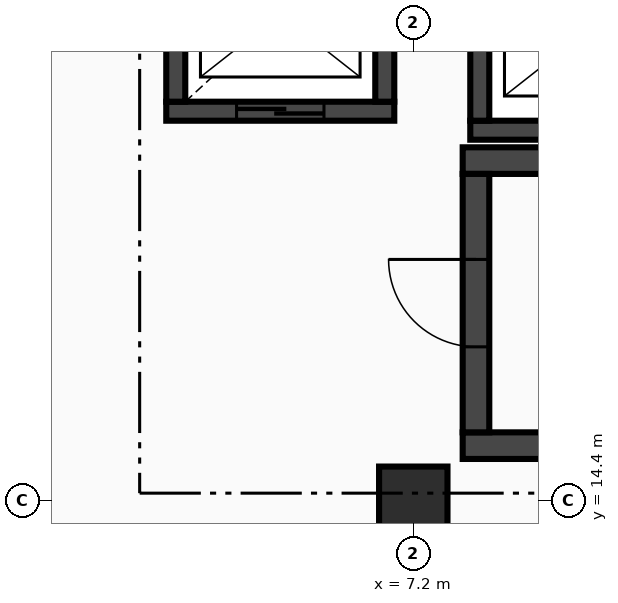
"""IFC4 building model, lengths in metres.
Left out: names, types, materials, properties, quantities, classifications, styles, units other than length and angle.
Written with IfcOpenShell. Run it as: python <this file> out.ifc"""

import sys

from ifc_helpers import new_model, si_unit, direction, frame, frame_2d, origin, origin_2d, place, context, subcontext, project, spatial, rectangle, extrude, element, fill, save


model = new_model("IFC4")
c1 = context("Model", 3, precision=1e-05, world=origin(), true_north=direction((0.0, 1.0)))
c2 = subcontext(c1, "Body", "Model", "MODEL_VIEW")
j1 = project(units=[si_unit("LENGTHUNIT", "METRE"), si_unit("PLANEANGLEUNIT", "RADIAN")], contexts=[c1])
p1 = place(None, origin())
s1 = spatial("IfcSite", under=j1, at=p1, CompositionType="ELEMENT")
p2 = place(p1, origin())
s2 = spatial("IfcBuilding", under=s1, at=p2, CompositionType="ELEMENT")
p3 = place(p2, origin())
s3 = spatial("IfcBuildingStorey", under=s2, at=p3, CompositionType="ELEMENT", Elevation=0.0)
p4 = place(p3, frame((7.2, 14.4, 0.0), z_axis=(0.0, 0.0, 1.0), x_axis=(1.0, 0.0, 0.0)))
e1 = element("IfcColumn", 1, at=p4, inside=s3, PredefinedType="COLUMN", context=c2, shape_type="SweptSolid", body=[
    extrude(rectangle(XDim=0.9, YDim=0.9, at=origin_2d()), origin(), (0.0, 0.0, 1.0), 5.4),
])
for number, where, z_axis, x_axis in (
    (2, (7.85, 15.125, 0.0), (0.0, 0.0, 1.0), (1.0, 0.0, 0.0)),
    (3, (17.15, 18.875, 0.0), (0.0, 0.0, 1.0), (-1.0, 0.0, 0.0)),
):
    element("IfcWall", number, at=place(p3, frame(where, z_axis=z_axis, x_axis=x_axis)), inside=s3, PredefinedType="SHEAR", context=c2, shape_type="SweptSolid", body=[
        extrude(rectangle(XDim=9.3, YDim=0.35, at=frame_2d((4.65, 0.0))), origin(), (0.0, 0.0, 1.0), 5.12),
    ])
p5 = place(p3, frame((8.025, 18.7, 0.0), z_axis=(0.0, 0.0, 1.0), x_axis=(0.0, -1.0, 0.0)))
e4 = element("IfcWall", 4, at=p5, inside=s3, PredefinedType="SHEAR", context=c2, shape_type="SweptSolid", body=[
    extrude(rectangle(XDim=3.4, YDim=0.35, at=frame_2d((1.7, 0.0))), origin(), (0.0, 0.0, 1.0), 5.12),
])
p6 = place(p5, frame((1.125, 0.0, 0.0)))
e5 = element("IfcOpeningElement", 5, at=p6, cuts=e4, PredefinedType="OPENING", context=c2, shape_type="SweptSolid", body=[
    extrude(rectangle(XDim=1.15, YDim=2.1, at=frame_2d((0.575, 1.05))), frame((0.0, 0.185, 0.0), z_axis=(0.0, -1.0, 0.0), x_axis=(1.0, 0.0, 0.0)), (0.0, 0.0, 1.0), 0.37),
])
p7 = place(p3, frame((3.95, 19.525, 0.0), z_axis=(0.0, 0.0, 1.0), x_axis=(1.0, 0.0, 0.0)))
e6 = element("IfcWall", 6, at=p7, inside=s3, PredefinedType="SHEAR", context=c2, shape_type="SweptSolid", body=[
    extrude(rectangle(XDim=3.0, YDim=0.25, at=frame_2d((1.5, 0.0))), origin(), (0.0, 0.0, 1.0), 5.12),
])
p8 = place(p7, frame((0.925, 0.0, 0.0)))
e7 = element("IfcOpeningElement", 7, at=p8, cuts=e6, PredefinedType="OPENING", context=c2, shape_type="SweptSolid", body=[
    extrude(rectangle(XDim=1.15, YDim=2.1, at=frame_2d((0.575, 1.05))), frame((0.0, 0.135, 0.0), z_axis=(0.0, -1.0, 0.0), x_axis=(1.0, 0.0, 0.0)), (0.0, 0.0, 1.0), 0.27),
])
for number, where, z_axis, x_axis in (
    (8, (4.075, 21.95, 0.0), (0.0, 0.0, 1.0), (0.0, -1.0, 0.0)),
    (9, (6.825, 19.65, 0.0), (0.0, 0.0, 1.0), (0.0, 1.0, 0.0)),
):
    element("IfcWall", number, at=place(p3, frame(where, z_axis=z_axis, x_axis=x_axis)), inside=s3, PredefinedType="SHEAR", context=c2, shape_type="SweptSolid", body=[
        extrude(rectangle(XDim=2.3, YDim=0.25, at=frame_2d((1.15, 0.0))), origin(), (0.0, 0.0, 1.0), 5.12),
    ])
p9 = place(p3, frame((7.95, 19.275, 0.0), z_axis=(0.0, 0.0, 1.0), x_axis=(1.0, 0.0, 0.0)))
e10 = element("IfcWall", 10, at=p9, inside=s3, PredefinedType="SHEAR", context=c2, shape_type="SweptSolid", body=[
    extrude(rectangle(XDim=3.0, YDim=0.25, at=frame_2d((1.5, 0.0))), origin(), (0.0, 0.0, 1.0), 5.12),
])
p10 = place(p3, frame((8.075, 21.7, 0.0), z_axis=(0.0, 0.0, 1.0), x_axis=(0.0, -1.0, 0.0)))
e11 = element("IfcWall", 11, at=p10, inside=s3, PredefinedType="SHEAR", context=c2, shape_type="SweptSolid", body=[
    extrude(rectangle(XDim=2.3, YDim=0.25, at=frame_2d((1.15, 0.0))), origin(), (0.0, 0.0, 1.0), 5.12),
])
p11 = place(p6, frame((1.15, 0.0, 0.0), z_axis=(0.0, 0.0, 1.0), x_axis=(-1.0, 0.0, 0.0)))
e12 = element("IfcDoor", 12, at=p11, inside=s3, OperationType="SINGLE_SWING_RIGHT", PredefinedType="DOOR", context=c2, shape_type="SweptSolid", body=[
    extrude(rectangle(XDim=1.15, YDim=2.1, at=frame_2d((0.575, 1.05))), frame((0.0, 0.025, 0.0), z_axis=(0.0, -1.0, 0.0), x_axis=(1.0, 0.0, 0.0)), (0.0, 0.0, 1.0), 0.05),
])
fill(e5, e12)
p12 = place(p8, origin())
e13 = element("IfcDoor", 13, at=p12, inside=s3, OperationType="SLIDING_TO_RIGHT", PredefinedType="DOOR", context=c2, shape_type="SweptSolid", body=[
    extrude(rectangle(XDim=1.15, YDim=2.1, at=frame_2d((0.575, 1.05))), frame((0.0, 0.025, 0.0), z_axis=(0.0, -1.0, 0.0), x_axis=(1.0, 0.0, 0.0)), (0.0, 0.0, 1.0), 0.05),
])
fill(e7, e13)
save(model, sys.argv[1])
